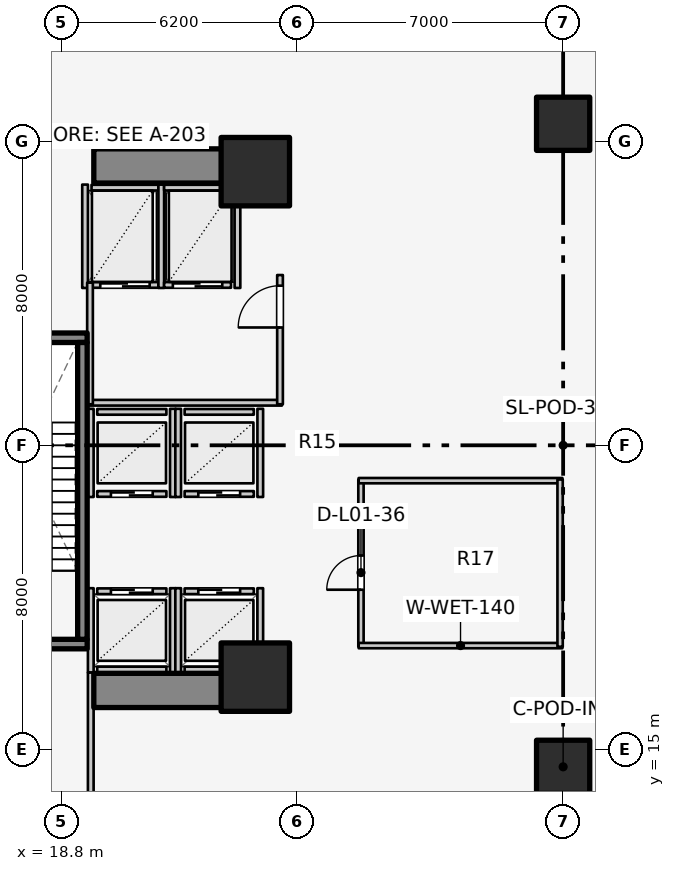
"""IFC4 building model, lengths in metres.
Left out: names, types, materials, properties, quantities, classifications, styles, units other than length and angle.
Written with IfcOpenShell. Run it as: python <this file> out.ifc"""

import sys

from ifc_helpers import new_model, si_unit, direction, frame, frame_2d, origin, origin_2d, place, context, subcontext, project, spatial, rectangle, extrude, element, fill, save


model = new_model("IFC4")
c1 = context("Model", 3, precision=1e-05, world=origin(), true_north=direction((0.0, 1.0)))
c2 = subcontext(c1, "Body", "Model", "MODEL_VIEW")
j1 = project(units=[si_unit("LENGTHUNIT", "METRE"), si_unit("PLANEANGLEUNIT", "RADIAN")], contexts=[c1])
p1 = place(None, origin())
s1 = spatial("IfcSite", under=j1, at=p1, CompositionType="ELEMENT")
p2 = place(p1, origin())
s2 = spatial("IfcBuilding", under=s1, at=p2, CompositionType="ELEMENT")
p3 = place(p2, origin())
s3 = spatial("IfcBuildingStorey", under=s2, at=p3, CompositionType="ELEMENT", Elevation=0.0)
for number, where, z_axis, x_axis in (
    (1, (19.65, 16.55, 0.0), (0.0, 0.0, 1.0), (1.0, 0.0, 0.0)),
    (2, (19.65, 30.35, 0.0), (0.0, 0.0, 1.0), (1.0, 0.0, 0.0)),
):
    element("IfcWall", number, at=place(p3, frame(where, z_axis=z_axis, x_axis=x_axis)), inside=s3, PredefinedType="SHEAR", context=c2, shape_type="SweptSolid", body=[
        extrude(rectangle(XDim=4.5, YDim=0.9, at=frame_2d((2.25, 0.0))), origin(), (0.0, 0.0, 1.0), 4.6),
    ])
p4 = place(p3, frame((16.105, 17.77, 0.0), z_axis=(0.0, 0.0, 1.0), x_axis=(1.0, 0.0, 0.0)))
e3 = element("IfcWall", 3, at=p4, inside=s3, PredefinedType="SOLIDWALL", context=c2, shape_type="SweptSolid", body=[
    extrude(rectangle(XDim=3.37, YDim=0.25, at=frame_2d((1.685, 0.0))), origin(), (0.0, 0.0, 1.0), 4.6),
])
p5 = place(p4, frame((1.135, 0.0, 0.0)))
e4 = element("IfcOpeningElement", 4, at=p5, cuts=e3, PredefinedType="OPENING", context=c2, shape_type="SweptSolid", body=[
    extrude(rectangle(XDim=1.1, YDim=2.1, at=frame_2d((0.55, 1.05))), frame((0.0, 0.135, 0.0), z_axis=(0.0, -1.0, 0.0), x_axis=(1.0, 0.0, 0.0)), (0.0, 0.0, 1.0), 0.27),
])
p6 = place(p3, frame((16.105, 25.83, 0.0), z_axis=(0.0, 0.0, 1.0), x_axis=(1.0, 0.0, 0.0)))
e5 = element("IfcWall", 5, at=p6, inside=s3, PredefinedType="SOLIDWALL", context=c2, shape_type="SweptSolid", body=[
    extrude(rectangle(XDim=3.37, YDim=0.25, at=frame_2d((1.685, 0.0))), origin(), (0.0, 0.0, 1.0), 4.6),
])
p7 = place(p3, frame((19.35, 17.895, 0.0), z_axis=(0.0, 0.0, 1.0), x_axis=(0.0, 1.0, 0.0)))
e6 = element("IfcWall", 6, at=p7, inside=s3, PredefinedType="SOLIDWALL", context=c2, shape_type="SweptSolid", body=[
    extrude(rectangle(XDim=7.81, YDim=0.25, at=frame_2d((3.905, 0.0))), origin(), (0.0, 0.0, 1.0), 4.6),
])
for number, where, z_axis, x_axis in (
    (7, (23.9, 16.9, 0.0), (0.0, 0.0, 1.0), (1.0, 0.0, 0.0)),
    (8, (23.9, 30.2, 0.0), (0.0, 0.0, 1.0), (1.0, 0.0, 0.0)),
):
    element("IfcColumn", number, at=place(p3, frame(where, z_axis=z_axis, x_axis=x_axis)), inside=s3, PredefinedType="COLUMN", context=c2, shape_type="SweptSolid", body=[
        extrude(rectangle(XDim=1.8, YDim=1.8, at=origin_2d()), origin(), (0.0, 0.0, 1.0), 4.6),
    ])
for number, where, z_axis, x_axis in (
    (9, (32.0, 14.54, 0.0), (0.0, 0.0, 1.0), (1.0, 0.0, 0.0)),
    (10, (32.0, 31.46, 0.0), (0.0, 0.0, 1.0), (1.0, 0.0, 0.0)),
):
    element("IfcColumn", number, at=place(p3, frame(where, z_axis=z_axis, x_axis=x_axis)), inside=s3, PredefinedType="COLUMN", context=c2, shape_type="SweptSolid", body=[
        extrude(rectangle(XDim=1.4, YDim=1.4, at=origin_2d()), origin(), (0.0, 0.0, 1.0), 4.6),
    ])
p8 = place(p3, frame((19.74, 19.16, 0.0), z_axis=(0.0, 0.0, 1.0), x_axis=(1.0, 0.0, 0.0)))
e11 = element("IfcWall", 11, at=p8, inside=s3, PredefinedType="SOLIDWALL", context=c2, shape_type="SweptSolid", body=[
    extrude(rectangle(XDim=1.82, YDim=0.15, at=frame_2d((0.91, 0.0))), origin(), (0.0, 0.0, 1.0), 4.255),
])
p9 = place(p8, frame((0.36, 0.0, 0.0)))
e12 = element("IfcOpeningElement", 12, at=p9, cuts=e11, PredefinedType="OPENING", context=c2, shape_type="SweptSolid", body=[
    extrude(rectangle(XDim=1.1, YDim=2.1, at=frame_2d((0.55, 1.05))), frame((0.0, 0.085, 0.0), z_axis=(0.0, -1.0, 0.0), x_axis=(1.0, 0.0, 0.0)), (0.0, 0.0, 1.0), 0.17),
])
p10 = place(p3, frame((19.74, 17.1, 0.0), z_axis=(0.0, 0.0, 1.0), x_axis=(1.0, 0.0, 0.0)))
e13 = element("IfcWall", 13, at=p10, inside=s3, PredefinedType="SOLIDWALL", context=c2, shape_type="SweptSolid", body=[
    extrude(rectangle(XDim=1.82, YDim=0.15, at=frame_2d((0.91, 0.0))), origin(), (0.0, 0.0, 1.0), 4.255),
])
p11 = place(p3, frame((19.57, 17.02, 0.0), z_axis=(0.0, 0.0, 1.0), x_axis=(0.0, 1.0, 0.0)))
e14 = element("IfcWall", 14, at=p11, inside=s3, PredefinedType="SOLIDWALL", context=c2, shape_type="SweptSolid", body=[
    extrude(rectangle(XDim=2.22, YDim=0.15, at=frame_2d((1.11, 0.0))), origin(), (0.0, 0.0, 1.0), 3.62),
])
p12 = place(p3, frame((21.73, 17.02, 0.0), z_axis=(0.0, 0.0, 1.0), x_axis=(0.0, 1.0, 0.0)))
e15 = element("IfcWall", 15, at=p12, inside=s3, PredefinedType="SOLIDWALL", context=c2, shape_type="SweptSolid", body=[
    extrude(rectangle(XDim=2.22, YDim=0.15, at=frame_2d((1.11, 0.0))), origin(), (0.0, 0.0, 1.0), 4.255),
])
p13 = place(p3, frame((22.04, 19.16, 0.0), z_axis=(0.0, 0.0, 1.0), x_axis=(1.0, 0.0, 0.0)))
e16 = element("IfcWall", 16, at=p13, inside=s3, PredefinedType="SOLIDWALL", context=c2, shape_type="SweptSolid", body=[
    extrude(rectangle(XDim=1.82, YDim=0.15, at=frame_2d((0.91, 0.0))), origin(), (0.0, 0.0, 1.0), 3.62),
])
p14 = place(p13, frame((0.36, 0.0, 0.0)))
e17 = element("IfcOpeningElement", 17, at=p14, cuts=e16, PredefinedType="OPENING", context=c2, shape_type="SweptSolid", body=[
    extrude(rectangle(XDim=1.1, YDim=2.1, at=frame_2d((0.55, 1.05))), frame((0.0, 0.085, 0.0), z_axis=(0.0, -1.0, 0.0), x_axis=(1.0, 0.0, 0.0)), (0.0, 0.0, 1.0), 0.17),
])
p15 = place(p3, frame((22.04, 17.1, 0.0), z_axis=(0.0, 0.0, 1.0), x_axis=(1.0, 0.0, 0.0)))
e18 = element("IfcWall", 18, at=p15, inside=s3, PredefinedType="SOLIDWALL", context=c2, shape_type="SweptSolid", body=[
    extrude(rectangle(XDim=1.82, YDim=0.15, at=frame_2d((0.91, 0.0))), origin(), (0.0, 0.0, 1.0), 3.62),
])
p16 = place(p3, frame((21.87, 17.02, 0.0), z_axis=(0.0, 0.0, 1.0), x_axis=(0.0, 1.0, 0.0)))
e19 = element("IfcWall", 19, at=p16, inside=s3, PredefinedType="SOLIDWALL", context=c2, shape_type="SweptSolid", body=[
    extrude(rectangle(XDim=2.22, YDim=0.15, at=frame_2d((1.11, 0.0))), origin(), (0.0, 0.0, 1.0), 4.255),
])
p17 = place(p3, frame((24.03, 17.02, 0.0), z_axis=(0.0, 0.0, 1.0), x_axis=(0.0, 1.0, 0.0)))
e20 = element("IfcWall", 20, at=p17, inside=s3, PredefinedType="SOLIDWALL", context=c2, shape_type="SweptSolid", body=[
    extrude(rectangle(XDim=2.22, YDim=0.15, at=frame_2d((1.11, 0.0))), origin(), (0.0, 0.0, 1.0), 3.3),
])
p18 = place(p3, frame((19.74, 21.72, 0.0), z_axis=(0.0, 0.0, 1.0), x_axis=(1.0, 0.0, 0.0)))
e21 = element("IfcWall", 21, at=p18, inside=s3, PredefinedType="SOLIDWALL", context=c2, shape_type="SweptSolid", body=[
    extrude(rectangle(XDim=1.82, YDim=0.15, at=frame_2d((0.91, 0.0))), origin(), (0.0, 0.0, 1.0), 4.255),
])
p19 = place(p18, frame((0.36, 0.0, 0.0)))
e22 = element("IfcOpeningElement", 22, at=p19, cuts=e21, PredefinedType="OPENING", context=c2, shape_type="SweptSolid", body=[
    extrude(rectangle(XDim=1.1, YDim=2.1, at=frame_2d((0.55, 1.05))), frame((0.0, 0.085, 0.0), z_axis=(0.0, -1.0, 0.0), x_axis=(1.0, 0.0, 0.0)), (0.0, 0.0, 1.0), 0.17),
])
p20 = place(p3, frame((19.74, 23.88, 0.0), z_axis=(0.0, 0.0, 1.0), x_axis=(1.0, 0.0, 0.0)))
e23 = element("IfcWall", 23, at=p20, inside=s3, PredefinedType="SOLIDWALL", context=c2, shape_type="SweptSolid", body=[
    extrude(rectangle(XDim=1.82, YDim=0.15, at=frame_2d((0.91, 0.0))), origin(), (0.0, 0.0, 1.0), 4.255),
])
for number, where, z_axis, x_axis in (
    (24, (19.57, 21.64, 0.0), (0.0, 0.0, 1.0), (0.0, 1.0, 0.0)),
    (25, (21.73, 21.64, 0.0), (0.0, 0.0, 1.0), (0.0, 1.0, 0.0)),
):
    element("IfcWall", number, at=place(p3, frame(where, z_axis=z_axis, x_axis=x_axis)), inside=s3, PredefinedType="SOLIDWALL", context=c2, shape_type="SweptSolid", body=[
        extrude(rectangle(XDim=2.32, YDim=0.15, at=frame_2d((1.16, 0.0))), origin(), (0.0, 0.0, 1.0), 4.255),
    ])
p21 = place(p3, frame((22.04, 21.72, 0.0), z_axis=(0.0, 0.0, 1.0), x_axis=(1.0, 0.0, 0.0)))
e26 = element("IfcWall", 26, at=p21, inside=s3, PredefinedType="SOLIDWALL", context=c2, shape_type="SweptSolid", body=[
    extrude(rectangle(XDim=1.82, YDim=0.15, at=frame_2d((0.91, 0.0))), origin(), (0.0, 0.0, 1.0), 3.62),
])
p22 = place(p21, frame((0.36, 0.0, 0.0)))
e27 = element("IfcOpeningElement", 27, at=p22, cuts=e26, PredefinedType="OPENING", context=c2, shape_type="SweptSolid", body=[
    extrude(rectangle(XDim=1.1, YDim=2.1, at=frame_2d((0.55, 1.05))), frame((0.0, 0.085, 0.0), z_axis=(0.0, -1.0, 0.0), x_axis=(1.0, 0.0, 0.0)), (0.0, 0.0, 1.0), 0.17),
])
p23 = place(p3, frame((22.04, 23.88, 0.0), z_axis=(0.0, 0.0, 1.0), x_axis=(1.0, 0.0, 0.0)))
e28 = element("IfcWall", 28, at=p23, inside=s3, PredefinedType="SOLIDWALL", context=c2, shape_type="SweptSolid", body=[
    extrude(rectangle(XDim=1.82, YDim=0.15, at=frame_2d((0.91, 0.0))), origin(), (0.0, 0.0, 1.0), 3.62),
])
p24 = place(p3, frame((21.87, 21.64, 0.0), z_axis=(0.0, 0.0, 1.0), x_axis=(0.0, 1.0, 0.0)))
e29 = element("IfcWall", 29, at=p24, inside=s3, PredefinedType="SOLIDWALL", context=c2, shape_type="SweptSolid", body=[
    extrude(rectangle(XDim=2.32, YDim=0.15, at=frame_2d((1.16, 0.0))), origin(), (0.0, 0.0, 1.0), 4.255),
])
p25 = place(p3, frame((24.03, 21.64, 0.0), z_axis=(0.0, 0.0, 1.0), x_axis=(0.0, 1.0, 0.0)))
e30 = element("IfcWall", 30, at=p25, inside=s3, PredefinedType="SOLIDWALL", context=c2, shape_type="SweptSolid", body=[
    extrude(rectangle(XDim=2.32, YDim=0.15, at=frame_2d((1.16, 0.0))), origin(), (0.0, 0.0, 1.0), 3.62),
])
p26 = place(p3, frame((19.59, 27.22, 0.0), z_axis=(0.0, 0.0, 1.0), x_axis=(1.0, 0.0, 0.0)))
e31 = element("IfcWall", 31, at=p26, inside=s3, PredefinedType="SOLIDWALL", context=c2, shape_type="SweptSolid", body=[
    extrude(rectangle(XDim=1.76, YDim=0.15, at=frame_2d((0.88, 0.0))), origin(), (0.0, 0.0, 1.0), 4.255),
])
p27 = place(p26, frame((0.23, 0.0, 0.0)))
e32 = element("IfcOpeningElement", 32, at=p27, cuts=e31, PredefinedType="OPENING", context=c2, shape_type="SweptSolid", body=[
    extrude(rectangle(XDim=1.3, YDim=2.1, at=frame_2d((0.65, 1.05))), frame((0.0, 0.085, 0.0), z_axis=(0.0, -1.0, 0.0), x_axis=(1.0, 0.0, 0.0)), (0.0, 0.0, 1.0), 0.17),
])
p28 = place(p3, frame((19.59, 29.78, 0.0), z_axis=(0.0, 0.0, 1.0), x_axis=(1.0, 0.0, 0.0)))
e33 = element("IfcWall", 33, at=p28, inside=s3, PredefinedType="SOLIDWALL", context=c2, shape_type="SweptSolid", body=[
    extrude(rectangle(XDim=1.76, YDim=0.15, at=frame_2d((0.88, 0.0))), origin(), (0.0, 0.0, 1.0), 4.255),
])
for number, where, z_axis, x_axis in (
    (34, (19.42, 27.14, 0.0), (0.0, 0.0, 1.0), (0.0, 1.0, 0.0)),
    (35, (21.425, 27.14, 0.0), (0.0, 0.0, 1.0), (0.0, 1.0, 0.0)),
):
    element("IfcWall", number, at=place(p3, frame(where, z_axis=z_axis, x_axis=x_axis)), inside=s3, PredefinedType="SOLIDWALL", context=c2, shape_type="SweptSolid", body=[
        extrude(rectangle(XDim=2.72, YDim=0.15, at=frame_2d((1.36, 0.0))), origin(), (0.0, 0.0, 1.0), 4.255),
    ])
p29 = place(p3, frame((21.5, 27.22, 0.0), z_axis=(0.0, 0.0, 1.0), x_axis=(1.0, 0.0, 0.0)))
e36 = element("IfcWall", 36, at=p29, inside=s3, PredefinedType="SOLIDWALL", context=c2, shape_type="SweptSolid", body=[
    extrude(rectangle(XDim=1.76, YDim=0.15, at=frame_2d((0.88, 0.0))), origin(), (0.0, 0.0, 1.0), 4.255),
])
p30 = place(p29, frame((0.23, 0.0, 0.0)))
e37 = element("IfcOpeningElement", 37, at=p30, cuts=e36, PredefinedType="OPENING", context=c2, shape_type="SweptSolid", body=[
    extrude(rectangle(XDim=1.3, YDim=2.1, at=frame_2d((0.65, 1.05))), frame((0.0, 0.085, 0.0), z_axis=(0.0, -1.0, 0.0), x_axis=(1.0, 0.0, 0.0)), (0.0, 0.0, 1.0), 0.17),
])
p31 = place(p3, frame((21.5, 29.78, 0.0), z_axis=(0.0, 0.0, 1.0), x_axis=(1.0, 0.0, 0.0)))
e38 = element("IfcWall", 38, at=p31, inside=s3, PredefinedType="SOLIDWALL", context=c2, shape_type="SweptSolid", body=[
    extrude(rectangle(XDim=1.76, YDim=0.15, at=frame_2d((0.88, 0.0))), origin(), (0.0, 0.0, 1.0), 4.255),
])
p32 = place(p3, frame((23.43, 27.14, 0.0), z_axis=(0.0, 0.0, 1.0), x_axis=(0.0, 1.0, 0.0)))
e39 = element("IfcWall", 39, at=p32, inside=s3, PredefinedType="SOLIDWALL", context=c2, shape_type="SweptSolid", body=[
    extrude(rectangle(XDim=2.72, YDim=0.15, at=frame_2d((1.36, 0.0))), origin(), (0.0, 0.0, 1.0), 4.255),
])
p33 = place(p3, frame((19.52, 24.12, 0.0), z_axis=(0.0, 0.0, 1.0), x_axis=(1.0, 0.0, 0.0)))
e40 = element("IfcWall", 40, at=p33, inside=s3, PredefinedType="PARTITIONING", context=c2, shape_type="SweptSolid", body=[
    extrude(rectangle(XDim=5.08, YDim=0.15, at=frame_2d((2.54, 0.0))), origin(), (0.0, 0.0, 1.0), 3.62),
])
p34 = place(p3, frame((19.55, 24.08, 0.0), z_axis=(0.0, 0.0, 1.0), x_axis=(0.0, 1.0, 0.0)))
e41 = element("IfcWall", 41, at=p34, inside=s3, PredefinedType="PARTITIONING", context=c2, shape_type="SweptSolid", body=[
    extrude(rectangle(XDim=3.2, YDim=0.15, at=frame_2d((1.6, 0.0))), origin(), (0.0, 0.0, 1.0), 4.255),
])
p35 = place(p3, frame((24.55, 24.08, 0.0), z_axis=(0.0, 0.0, 1.0), x_axis=(0.0, 1.0, 0.0)))
e42 = element("IfcWall", 42, at=p35, inside=s3, PredefinedType="PARTITIONING", context=c2, shape_type="SweptSolid", body=[
    extrude(rectangle(XDim=3.4, YDim=0.15, at=frame_2d((1.7, 0.0))), origin(), (0.0, 0.0, 1.0), 4.255),
])
p36 = place(p35, frame((2.02, 0.0, 0.0)))
e43 = element("IfcOpeningElement", 43, at=p36, cuts=e42, PredefinedType="OPENING", context=c2, shape_type="SweptSolid", body=[
    extrude(rectangle(XDim=1.1, YDim=2.1, at=frame_2d((0.55, 1.05))), frame((0.0, 0.085, 0.0), z_axis=(0.0, -1.0, 0.0), x_axis=(1.0, 0.0, 0.0)), (0.0, 0.0, 1.0), 0.17),
])
p37 = place(p3, frame((19.57, 13.55, 0.0), z_axis=(0.0, 0.0, 1.0), x_axis=(0.0, 1.0, 0.0)))
e44 = element("IfcWall", 44, at=p37, inside=s3, PredefinedType="PARTITIONING", context=c2, shape_type="SweptSolid", body=[
    extrude(rectangle(XDim=3.47, YDim=0.15, at=frame_2d((1.735, 0.0))), origin(), (0.0, 0.0, 1.0), 4.255),
])
p38 = place(p3, frame((26.68, 17.7, 0.0), z_axis=(0.0, 0.0, 1.0), x_axis=(0.0, 1.0, 0.0)))
e45 = element("IfcWall", 45, at=p38, inside=s3, PredefinedType="PLUMBINGWALL", context=c2, shape_type="SweptSolid", body=[
    extrude(rectangle(XDim=4.4, YDim=0.14, at=frame_2d((2.2, 0.0))), origin(), (0.0, 0.0, 1.0), 4.255),
])
p39 = place(p38, frame((1.5, 0.0, 0.0)))
e46 = element("IfcOpeningElement", 46, at=p39, cuts=e45, PredefinedType="OPENING", context=c2, shape_type="SweptSolid", body=[
    extrude(rectangle(XDim=0.9, YDim=2.1, at=frame_2d((0.45, 1.05))), frame((0.0, 0.08, 0.0), z_axis=(0.0, -1.0, 0.0), x_axis=(1.0, 0.0, 0.0)), (0.0, 0.0, 1.0), 0.16),
])
for number, where, z_axis, x_axis in (
    (47, (26.62, 17.73, 0.0), (0.0, 0.0, 1.0), (1.0, 0.0, 0.0)),
    (48, (26.62, 22.07, 0.0), (0.0, 0.0, 1.0), (1.0, 0.0, 0.0)),
):
    element("IfcWall", number, at=place(p3, frame(where, z_axis=z_axis, x_axis=x_axis)), inside=s3, PredefinedType="PLUMBINGWALL", context=c2, shape_type="SweptSolid", body=[
        extrude(rectangle(XDim=5.36, YDim=0.14, at=frame_2d((2.68, 0.0))), origin(), (0.0, 0.0, 1.0), 4.255),
    ])
p40 = place(p3, frame((31.92, 17.7, 0.0), z_axis=(0.0, 0.0, 1.0), x_axis=(0.0, 1.0, 0.0)))
e49 = element("IfcWall", 49, at=p40, inside=s3, PredefinedType="PLUMBINGWALL", context=c2, shape_type="SweptSolid", body=[
    extrude(rectangle(XDim=4.4, YDim=0.14, at=frame_2d((2.2, 0.0))), origin(), (0.0, 0.0, 1.0), 4.255),
])
p41 = place(p9, origin())
e50 = element("IfcDoor", 50, at=p41, inside=s3, OperationType="DOUBLE_DOOR_SLIDING", PredefinedType="DOOR", context=c2, shape_type="SweptSolid", body=[
    extrude(rectangle(XDim=1.1, YDim=2.1, at=frame_2d((0.55, 1.05))), frame((0.0, 0.025, 0.0), z_axis=(0.0, -1.0, 0.0), x_axis=(1.0, 0.0, 0.0)), (0.0, 0.0, 1.0), 0.05),
])
fill(e12, e50)
p42 = place(p14, origin())
e51 = element("IfcDoor", 51, at=p42, inside=s3, OperationType="DOUBLE_DOOR_SLIDING", PredefinedType="DOOR", context=c2, shape_type="SweptSolid", body=[
    extrude(rectangle(XDim=1.1, YDim=2.1, at=frame_2d((0.55, 1.05))), frame((0.0, 0.025, 0.0), z_axis=(0.0, -1.0, 0.0), x_axis=(1.0, 0.0, 0.0)), (0.0, 0.0, 1.0), 0.05),
])
fill(e17, e51)
p43 = place(p19, origin())
e52 = element("IfcDoor", 52, at=p43, inside=s3, OperationType="DOUBLE_DOOR_SLIDING", PredefinedType="DOOR", context=c2, shape_type="SweptSolid", body=[
    extrude(rectangle(XDim=1.1, YDim=2.1, at=frame_2d((0.55, 1.05))), frame((0.0, 0.025, 0.0), z_axis=(0.0, -1.0, 0.0), x_axis=(1.0, 0.0, 0.0)), (0.0, 0.0, 1.0), 0.05),
])
fill(e22, e52)
p44 = place(p22, origin())
e53 = element("IfcDoor", 53, at=p44, inside=s3, OperationType="DOUBLE_DOOR_SLIDING", PredefinedType="DOOR", context=c2, shape_type="SweptSolid", body=[
    extrude(rectangle(XDim=1.1, YDim=2.1, at=frame_2d((0.55, 1.05))), frame((0.0, 0.025, 0.0), z_axis=(0.0, -1.0, 0.0), x_axis=(1.0, 0.0, 0.0)), (0.0, 0.0, 1.0), 0.05),
])
fill(e27, e53)
p45 = place(p27, origin())
e54 = element("IfcDoor", 54, at=p45, inside=s3, OperationType="DOUBLE_DOOR_SLIDING", PredefinedType="DOOR", context=c2, shape_type="SweptSolid", body=[
    extrude(rectangle(XDim=1.3, YDim=2.1, at=frame_2d((0.65, 1.05))), frame((0.0, 0.025, 0.0), z_axis=(0.0, -1.0, 0.0), x_axis=(1.0, 0.0, 0.0)), (0.0, 0.0, 1.0), 0.05),
])
fill(e32, e54)
p46 = place(p30, origin())
e55 = element("IfcDoor", 55, at=p46, inside=s3, OperationType="DOUBLE_DOOR_SLIDING", PredefinedType="DOOR", context=c2, shape_type="SweptSolid", body=[
    extrude(rectangle(XDim=1.3, YDim=2.1, at=frame_2d((0.65, 1.05))), frame((0.0, 0.025, 0.0), z_axis=(0.0, -1.0, 0.0), x_axis=(1.0, 0.0, 0.0)), (0.0, 0.0, 1.0), 0.05),
])
fill(e37, e55)
p47 = place(p36, origin())
e56 = element("IfcDoor", 56, at=p47, inside=s3, OperationType="SINGLE_SWING_LEFT", PredefinedType="DOOR", context=c2, shape_type="SweptSolid", body=[
    extrude(rectangle(XDim=1.1, YDim=2.1, at=frame_2d((0.55, 1.05))), frame((0.0, 0.025, 0.0), z_axis=(0.0, -1.0, 0.0), x_axis=(1.0, 0.0, 0.0)), (0.0, 0.0, 1.0), 0.05),
])
fill(e43, e56)
p48 = place(p39, origin())
e57 = element("IfcDoor", 57, at=p48, inside=s3, OperationType="SINGLE_SWING_LEFT", PredefinedType="DOOR", context=c2, shape_type="SweptSolid", body=[
    extrude(rectangle(XDim=0.9, YDim=2.1, at=frame_2d((0.45, 1.05))), frame((0.0, 0.025, 0.0), z_axis=(0.0, -1.0, 0.0), x_axis=(1.0, 0.0, 0.0)), (0.0, 0.0, 1.0), 0.05),
])
fill(e46, e57)
save(model, sys.argv[1])
